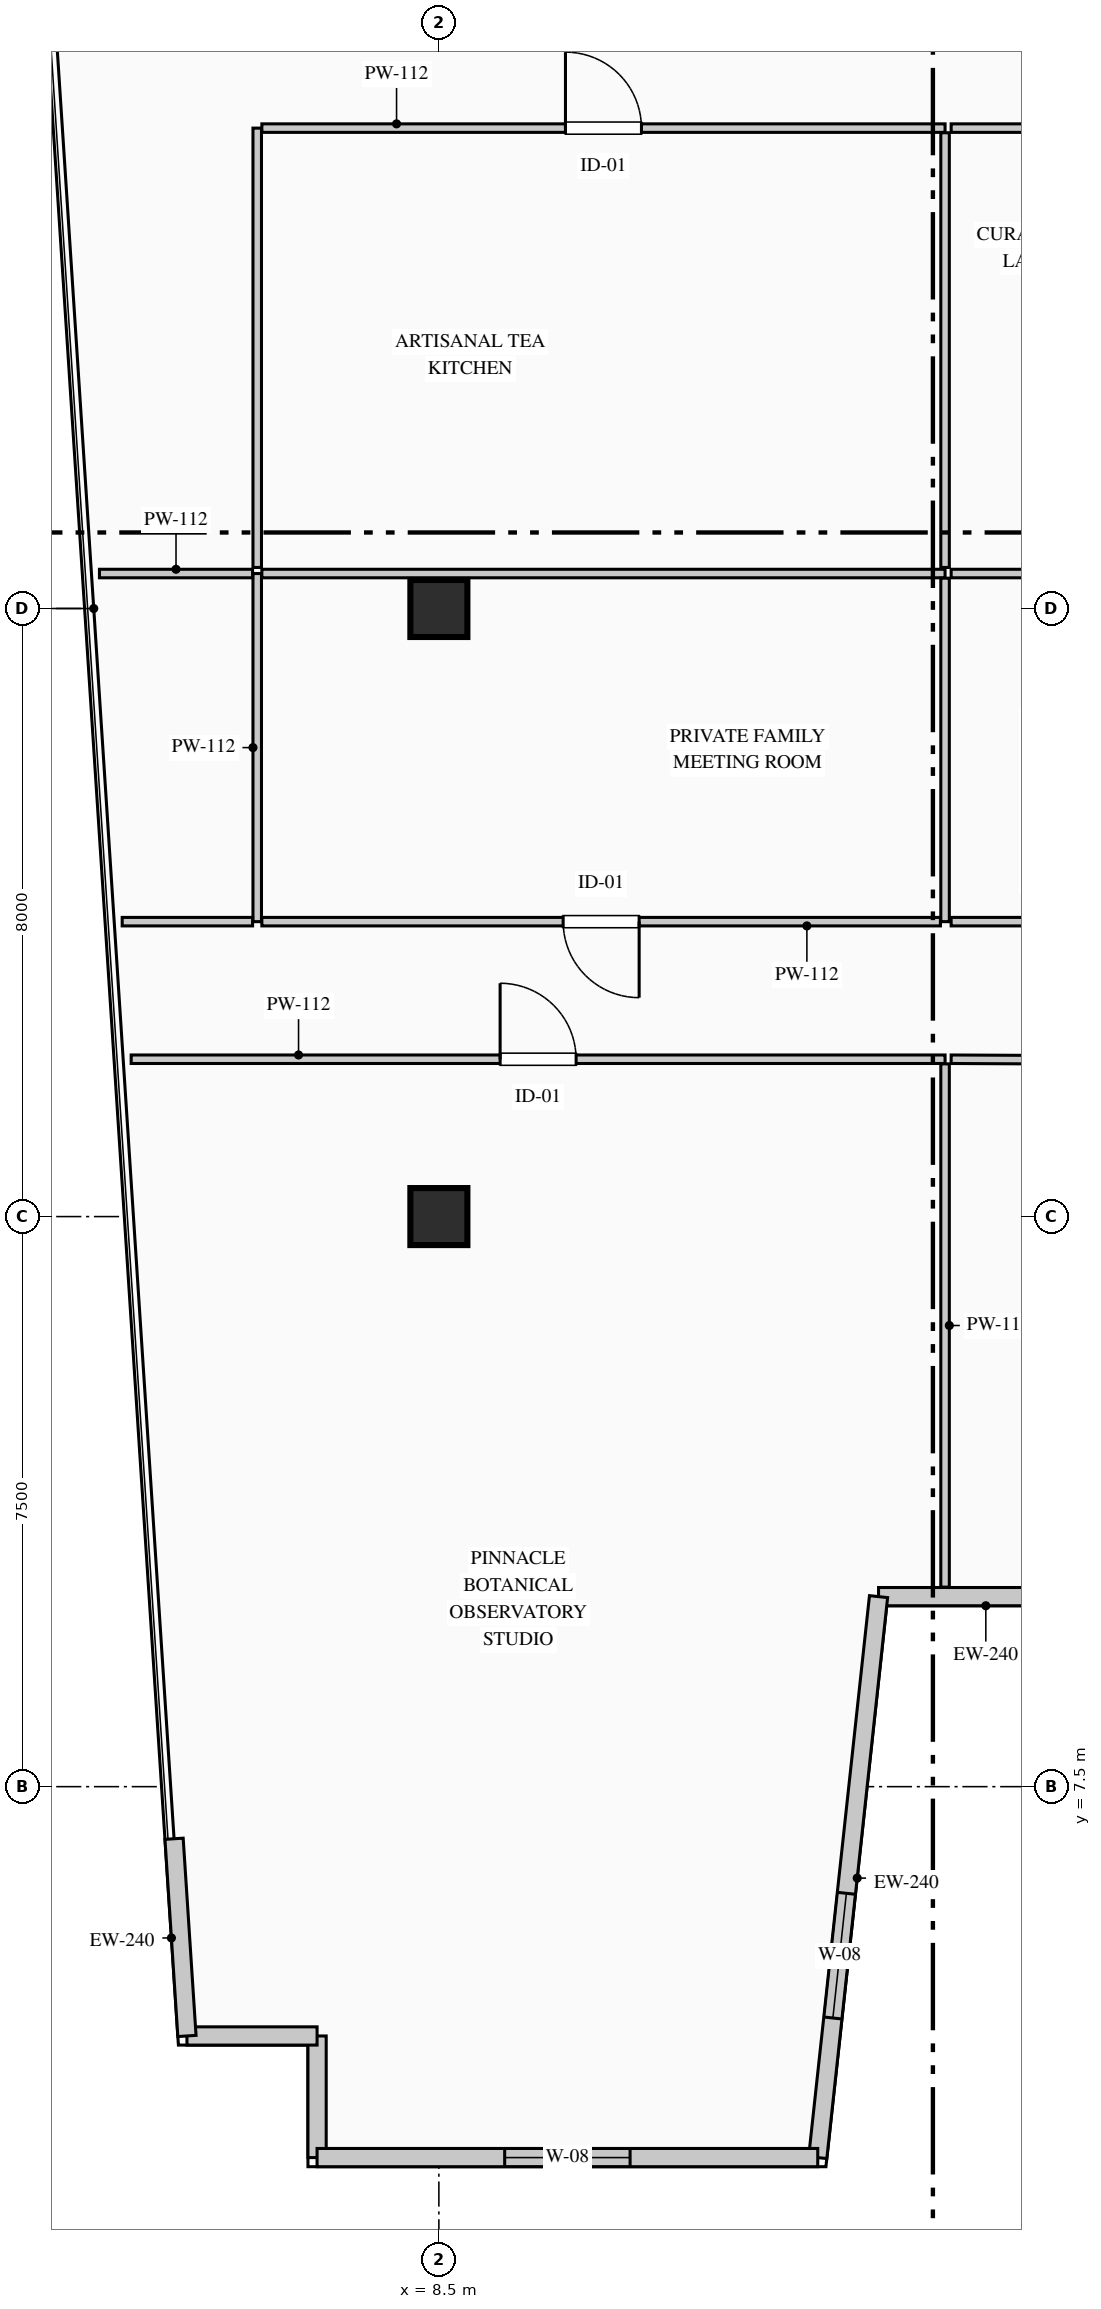
"""IFC4 building model, lengths in metres.
Left out: names, types, materials, properties, quantities, classifications, styles, units other than length and angle.
Written with IfcOpenShell. Run it as: python <this file> out.ifc"""

import sys

from ifc_helpers import new_model, si_unit, direction, frame, frame_2d, origin, origin_2d, place, context, subcontext, project, spatial, rectangle, extrude, element, fill, save


model = new_model("IFC4")
c1 = context("Model", 3, precision=1e-05, world=origin(), true_north=direction((0.0, 1.0)))
c2 = subcontext(c1, "Body", "Model", "MODEL_VIEW")
j1 = project(units=[si_unit("LENGTHUNIT", "METRE"), si_unit("PLANEANGLEUNIT", "RADIAN")], contexts=[c1])
p1 = place(None, origin())
s1 = spatial("IfcSite", under=j1, at=p1, CompositionType="ELEMENT")
p2 = place(p1, origin())
s2 = spatial("IfcBuilding", under=s1, at=p2, CompositionType="ELEMENT")
p3 = place(p2, frame((0.0, 0.0, 312.0)))
s3 = spatial("IfcBuildingStorey", under=s2, at=p3, CompositionType="ELEMENT", Elevation=312.0)
for number, where, z_axis, x_axis in (
    (1, (8.5, 15.0, 0.0), (0.0, 0.0, 1.0), (1.0, 0.0, 0.0)),
    (2, (8.5, 23.0, 0.0), (0.0, 0.0, 1.0), (1.0, 0.0, 0.0)),
):
    element("IfcColumn", number, at=place(p3, frame(where, z_axis=z_axis, x_axis=x_axis)), inside=s3, PredefinedType="COLUMN", context=c2, shape_type="SweptSolid", body=[
        extrude(rectangle(XDim=0.75, YDim=0.75, at=origin_2d()), origin(), (0.0, 0.0, 1.0), 3.95),
    ])
p4 = place(p3, frame((6.897, 2.62, 0.0), z_axis=(0.0, 0.0, 1.0), x_axis=(0.0, 1.0, 0.0)))
e3 = element("IfcWall", 3, at=p4, inside=s3, PredefinedType="STANDARD", context=c2, shape_type="SweptSolid", body=[
    extrude(rectangle(XDim=1.6, YDim=0.24, at=frame_2d((0.8, 0.0))), origin(), (0.0, 0.0, 1.0), 3.7),
])
p5 = place(p3, frame((6.897, 4.22, 0.0), z_axis=(0.0, 0.0, 1.0), x_axis=(-1.0, 0.0, 0.0)))
e4 = element("IfcWall", 4, at=p5, inside=s3, PredefinedType="STANDARD", context=c2, shape_type="SweptSolid", body=[
    extrude(rectangle(XDim=1.712, YDim=0.24, at=frame_2d((0.856, 0.0))), origin(), (0.0, 0.0, 1.0), 3.7),
])
p6 = place(p3, frame((5.185, 4.22, 0.0), z_axis=(0.0, 0.0, 1.0), x_axis=(-0.065073039336, 0.997880503643, 0.0)))
e5 = element("IfcWall", 5, at=p6, inside=s3, PredefinedType="STANDARD", context=c2, shape_type="SweptSolid", body=[
    extrude(rectangle(XDim=2.6, YDim=0.24, at=frame_2d((1.3, 0.0))), origin(), (0.0, 0.0, 1.0), 3.7),
])
p7 = place(p3, frame((17.108, 10.0, 0.0), z_axis=(0.0, 0.0, 1.0), x_axis=(-1.0, 0.0, 0.0)))
e6 = element("IfcWall", 6, at=p7, inside=s3, PredefinedType="STANDARD", context=c2, shape_type="SweptSolid", body=[
    extrude(rectangle(XDim=2.823, YDim=0.24, at=frame_2d((1.411, 0.0))), origin(), (0.0, 0.0, 1.0), 3.7),
])
p8 = place(p3, frame((14.285, 10.0, 0.0), z_axis=(0.0, 0.0, 1.0), x_axis=(-0.107777936076, -0.994174992894, 0.0)))
e7 = element("IfcWall", 7, at=p8, inside=s3, PredefinedType="STANDARD", context=c2, shape_type="SweptSolid", body=[
    extrude(rectangle(XDim=7.423, YDim=0.24, at=frame_2d((3.711, 0.0))), origin(), (0.0, 0.0, 1.0), 3.7),
])
p9 = place(p8, frame((3.926, 0.0, 0.9)))
e8 = element("IfcOpeningElement", 8, at=p9, cuts=e7, PredefinedType="OPENING", context=c2, shape_type="SweptSolid", body=[
    extrude(rectangle(XDim=1.65, YDim=1.95, at=frame_2d((0.825, 0.975))), frame((0.0, 0.13, 0.0), z_axis=(0.0, -1.0, 0.0), x_axis=(1.0, 0.0, 0.0)), (0.0, 0.0, 1.0), 0.26),
])
p10 = place(p3, frame((13.485, 2.62, 0.0), z_axis=(0.0, 0.0, 1.0), x_axis=(-1.0, 0.0, 0.0)))
e9 = element("IfcWall", 9, at=p10, inside=s3, PredefinedType="STANDARD", context=c2, shape_type="SweptSolid", body=[
    extrude(rectangle(XDim=6.587, YDim=0.24, at=frame_2d((3.294, 0.0))), origin(), (0.0, 0.0, 1.0), 3.7),
])
p11 = place(p10, frame((2.469, 0.0, 0.9)))
e10 = element("IfcOpeningElement", 10, at=p11, cuts=e9, PredefinedType="OPENING", context=c2, shape_type="SweptSolid", body=[
    extrude(rectangle(XDim=1.65, YDim=1.95, at=frame_2d((0.825, 0.975))), frame((0.0, 0.13, 0.0), z_axis=(0.0, -1.0, 0.0), x_axis=(1.0, 0.0, 0.0)), (0.0, 0.0, 1.0), 0.26),
])
p12 = place(p3, frame((4.451, 17.07, 0.0), z_axis=(0.0, 0.0, 1.0), x_axis=(1.0, 0.0, 0.0)))
e11 = element("IfcWall", 11, at=p12, inside=s3, PredefinedType="PARTITIONING", context=c2, shape_type="SweptSolid", body=[
    extrude(rectangle(XDim=10.708, YDim=0.112, at=frame_2d((5.354, 0.0))), origin(), (0.0, 0.0, 1.0), 3.7),
])
p13 = place(p12, frame((4.854, 0.0, 0.0)))
e12 = element("IfcOpeningElement", 12, at=p13, cuts=e11, PredefinedType="OPENING", context=c2, shape_type="SweptSolid", body=[
    extrude(rectangle(XDim=1.0, YDim=2.15, at=frame_2d((0.5, 1.075))), frame((0.0, 0.066, 0.0), z_axis=(0.0, -1.0, 0.0), x_axis=(1.0, 0.0, 0.0)), (0.0, 0.0, 1.0), 0.132),
])
p14 = place(p3, frame((15.16, 17.009, 0.0), z_axis=(0.0, 0.0, 1.0), x_axis=(0.0, -1.0, 0.0)))
e13 = element("IfcWall", 13, at=p14, inside=s3, PredefinedType="PARTITIONING", context=c2, shape_type="SweptSolid", body=[
    extrude(rectangle(XDim=6.884, YDim=0.112, at=frame_2d((3.442, 0.0))), origin(), (0.0, 0.0, 1.0), 3.7),
])
p15 = place(p3, frame((15.24, 17.07, 0.0), z_axis=(0.0, 0.0, 1.0), x_axis=(0.999988036902, -0.0048914265, 0.0)))
e14 = element("IfcWall", 14, at=p15, inside=s3, PredefinedType="PARTITIONING", context=c2, shape_type="SweptSolid", body=[
    extrude(rectangle(XDim=5.141, YDim=0.112, at=frame_2d((2.57, 0.0))), origin(), (0.0, 0.0, 1.0), 3.7),
])
p16 = place(p15, frame((2.071, 0.0, 0.0)))
e15 = element("IfcOpeningElement", 15, at=p16, cuts=e14, PredefinedType="OPENING", context=c2, shape_type="SweptSolid", body=[
    extrude(rectangle(XDim=1.0, YDim=2.15, at=frame_2d((0.5, 1.075))), frame((0.0, 0.066, 0.0), z_axis=(0.0, -1.0, 0.0), x_axis=(1.0, 0.0, 0.0)), (0.0, 0.0, 1.0), 0.132),
])
p17 = place(p3, frame((6.11, 18.88, 0.0), z_axis=(0.0, 0.0, 1.0), x_axis=(0.0, 1.0, 0.0)))
e16 = element("IfcWall", 16, at=p17, inside=s3, PredefinedType="PARTITIONING", context=c2, shape_type="SweptSolid", body=[
    extrude(rectangle(XDim=4.58, YDim=0.112, at=frame_2d((2.29, 0.0))), origin(), (0.0, 0.0, 1.0), 3.7),
])
p18 = place(p3, frame((4.034, 23.46, 0.0), z_axis=(0.0, 0.0, 1.0), x_axis=(1.0, 0.0, 0.0)))
e17 = element("IfcWall", 17, at=p18, inside=s3, PredefinedType="PARTITIONING", context=c2, shape_type="SweptSolid", body=[
    extrude(rectangle(XDim=2.015, YDim=0.112, at=frame_2d((1.007, 0.0))), origin(), (0.0, 0.0, 1.0), 3.7),
])
p19 = place(p3, frame((6.171, 23.46, 0.0), z_axis=(0.0, 0.0, 1.0), x_axis=(1.0, 0.0, 0.0)))
e18 = element("IfcWall", 18, at=p19, inside=s3, PredefinedType="PARTITIONING", context=c2, shape_type="SweptSolid", body=[
    extrude(rectangle(XDim=8.989, YDim=0.112, at=frame_2d((4.495, 0.0))), origin(), (0.0, 0.0, 1.0), 3.7),
])
p20 = place(p3, frame((15.16, 23.399, 0.0), z_axis=(0.0, 0.0, 1.0), x_axis=(0.0, -1.0, 0.0)))
e19 = element("IfcWall", 19, at=p20, inside=s3, PredefinedType="PARTITIONING", context=c2, shape_type="SweptSolid", body=[
    extrude(rectangle(XDim=4.519, YDim=0.112, at=frame_2d((2.26, 0.0))), origin(), (0.0, 0.0, 1.0), 3.7),
])
p21 = place(p3, frame((6.049, 18.88, 0.0), z_axis=(0.0, 0.0, 1.0), x_axis=(-1.0, 0.0, 0.0)))
e20 = element("IfcWall", 20, at=p21, inside=s3, PredefinedType="PARTITIONING", context=c2, shape_type="SweptSolid", body=[
    extrude(rectangle(XDim=1.716, YDim=0.112, at=frame_2d((0.858, 0.0))), origin(), (0.0, 0.0, 1.0), 3.7),
])
p22 = place(p3, frame((15.099, 18.88, 0.0), z_axis=(0.0, 0.0, 1.0), x_axis=(-1.0, 0.0, 0.0)))
e21 = element("IfcWall", 21, at=p22, inside=s3, PredefinedType="PARTITIONING", context=c2, shape_type="SweptSolid", body=[
    extrude(rectangle(XDim=8.928, YDim=0.112, at=frame_2d((4.464, 0.0))), origin(), (0.0, 0.0, 1.0), 3.7),
])
p23 = place(p22, frame((3.964, 0.0, 0.0)))
e22 = element("IfcOpeningElement", 22, at=p23, cuts=e21, PredefinedType="OPENING", context=c2, shape_type="SweptSolid", body=[
    extrude(rectangle(XDim=1.0, YDim=2.15, at=frame_2d((0.5, 1.075))), frame((0.0, 0.066, 0.0), z_axis=(0.0, -1.0, 0.0), x_axis=(1.0, 0.0, 0.0)), (0.0, 0.0, 1.0), 0.132),
])
for number, where, z_axis, x_axis in (
    (23, (18.489, 18.88, 0.0), (0.0, 0.0, 1.0), (-1.0, 0.0, 0.0)),
    (24, (15.24, 23.46, 0.0), (0.0, 0.0, 1.0), (1.0, 0.0, 0.0)),
):
    element("IfcWall", number, at=place(p3, frame(where, z_axis=z_axis, x_axis=x_axis)), inside=s3, PredefinedType="PARTITIONING", context=c2, shape_type="SweptSolid", body=[
        extrude(rectangle(XDim=3.249, YDim=0.112, at=frame_2d((1.625, 0.0))), origin(), (0.0, 0.0, 1.0), 3.7),
    ])
p24 = place(p3, frame((6.11, 23.54, 0.0), z_axis=(0.0, 0.0, 1.0), x_axis=(0.0, 1.0, 0.0)))
e25 = element("IfcWall", 25, at=p24, inside=s3, PredefinedType="PARTITIONING", context=c2, shape_type="SweptSolid", body=[
    extrude(rectangle(XDim=5.78, YDim=0.112, at=frame_2d((2.89, 0.0))), origin(), (0.0, 0.0, 1.0), 3.7),
])
p25 = place(p3, frame((6.171, 29.32, 0.0), z_axis=(0.0, 0.0, 1.0), x_axis=(1.0, 0.0, 0.0)))
e26 = element("IfcWall", 26, at=p25, inside=s3, PredefinedType="PARTITIONING", context=c2, shape_type="SweptSolid", body=[
    extrude(rectangle(XDim=8.989, YDim=0.112, at=frame_2d((4.495, 0.0))), origin(), (0.0, 0.0, 1.0), 3.7),
])
p26 = place(p25, frame((3.994, 0.0, 0.0)))
e27 = element("IfcOpeningElement", 27, at=p26, cuts=e26, PredefinedType="OPENING", context=c2, shape_type="SweptSolid", body=[
    extrude(rectangle(XDim=1.0, YDim=2.15, at=frame_2d((0.5, 1.075))), frame((0.0, 0.066, 0.0), z_axis=(0.0, -1.0, 0.0), x_axis=(1.0, 0.0, 0.0)), (0.0, 0.0, 1.0), 0.132),
])
p27 = place(p3, frame((15.16, 29.259, 0.0), z_axis=(0.0, 0.0, 1.0), x_axis=(0.0, -1.0, 0.0)))
e28 = element("IfcWall", 28, at=p27, inside=s3, PredefinedType="PARTITIONING", context=c2, shape_type="SweptSolid", body=[
    extrude(rectangle(XDim=5.719, YDim=0.112, at=frame_2d((2.859, 0.0))), origin(), (0.0, 0.0, 1.0), 3.7),
])
p28 = place(p3, frame((15.24, 29.32, 0.0), z_axis=(0.0, 0.0, 1.0), x_axis=(1.0, 0.0, 0.0)))
e29 = element("IfcWall", 29, at=p28, inside=s3, PredefinedType="PARTITIONING", context=c2, shape_type="SweptSolid", body=[
    extrude(rectangle(XDim=3.31, YDim=0.112, at=frame_2d((1.655, 0.0))), origin(), (0.0, 0.0, 1.0), 3.7),
])
p29 = place(p9, origin())
e30 = element("IfcWindow", 30, at=p29, inside=s3, PartitioningType="SINGLE_PANEL", PredefinedType="WINDOW", context=c2, shape_type="SweptSolid", body=[
    extrude(rectangle(XDim=1.65, YDim=1.95, at=frame_2d((0.825, 0.975))), frame((0.0, 0.03, 0.0), z_axis=(0.0, -1.0, 0.0), x_axis=(1.0, 0.0, 0.0)), (0.0, 0.0, 1.0), 0.06),
])
fill(e8, e30)
p30 = place(p11, origin())
e31 = element("IfcWindow", 31, at=p30, inside=s3, PartitioningType="SINGLE_PANEL", PredefinedType="WINDOW", context=c2, shape_type="SweptSolid", body=[
    extrude(rectangle(XDim=1.65, YDim=1.95, at=frame_2d((0.825, 0.975))), frame((0.0, 0.03, 0.0), z_axis=(0.0, -1.0, 0.0), x_axis=(1.0, 0.0, 0.0)), (0.0, 0.0, 1.0), 0.06),
])
fill(e10, e31)
p31 = place(p13, origin())
e32 = element("IfcDoor", 32, at=p31, inside=s3, OperationType="SINGLE_SWING_LEFT", PredefinedType="DOOR", context=c2, shape_type="SweptSolid", body=[
    extrude(rectangle(XDim=1.0, YDim=2.15, at=frame_2d((0.5, 1.075))), frame((0.0, 0.025, 0.0), z_axis=(0.0, -1.0, 0.0), x_axis=(1.0, 0.0, 0.0)), (0.0, 0.0, 1.0), 0.05),
])
fill(e12, e32)
p32 = place(p23, origin())
e33 = element("IfcDoor", 33, at=p32, inside=s3, OperationType="SINGLE_SWING_LEFT", PredefinedType="DOOR", context=c2, shape_type="SweptSolid", body=[
    extrude(rectangle(XDim=1.0, YDim=2.15, at=frame_2d((0.5, 1.075))), frame((0.0, 0.025, 0.0), z_axis=(0.0, -1.0, 0.0), x_axis=(1.0, 0.0, 0.0)), (0.0, 0.0, 1.0), 0.05),
])
fill(e22, e33)
p33 = place(p26, origin())
e34 = element("IfcDoor", 34, at=p33, inside=s3, OperationType="SINGLE_SWING_LEFT", PredefinedType="DOOR", context=c2, shape_type="SweptSolid", body=[
    extrude(rectangle(XDim=1.0, YDim=2.15, at=frame_2d((0.5, 1.075))), frame((0.0, 0.025, 0.0), z_axis=(0.0, -1.0, 0.0), x_axis=(1.0, 0.0, 0.0)), (0.0, 0.0, 1.0), 0.05),
])
fill(e27, e34)
save(model, sys.argv[1])
